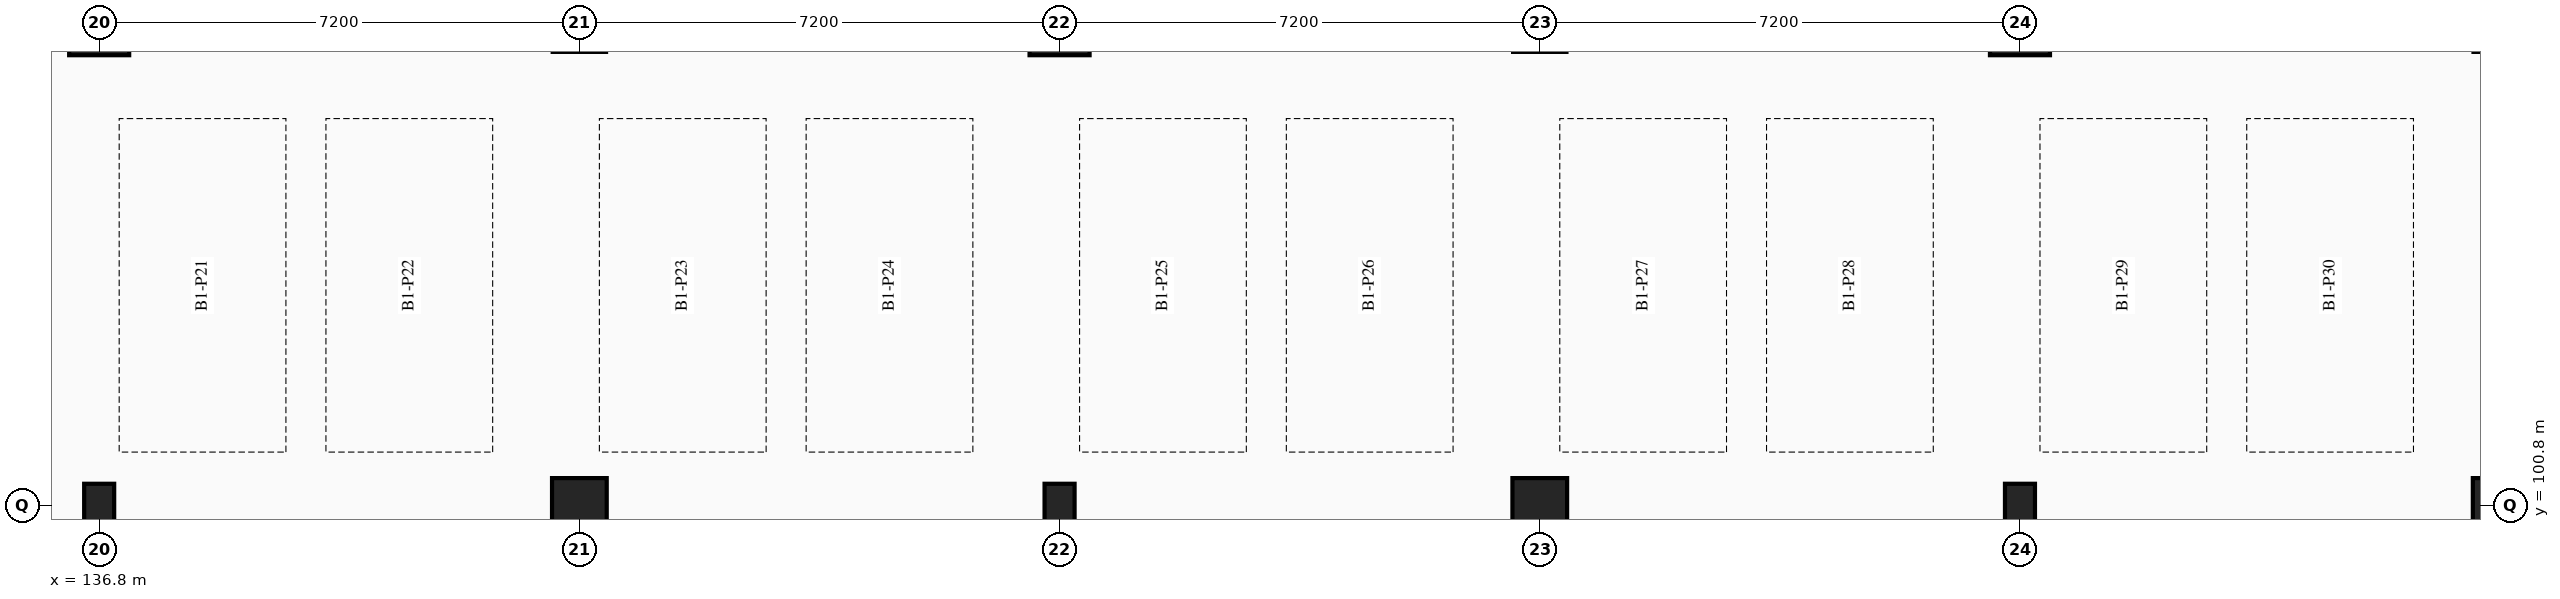
"""IFC4 building model, lengths in metres.
Left out: names, types, materials, properties, quantities, classifications, styles, units other than length and angle.
Written with IfcOpenShell. Run it as: python <this file> out.ifc"""

import sys

from ifc_helpers import new_model, si_unit, direction, frame, origin, origin_2d, place, context, subcontext, project, spatial, rectangle, extrude, element, save


model = new_model("IFC4")
c1 = context("Model", 3, precision=1e-05, world=origin(), true_north=direction((0.0, 1.0)))
c2 = subcontext(c1, "Body", "Model", "MODEL_VIEW")
j1 = project(units=[si_unit("LENGTHUNIT", "METRE"), si_unit("PLANEANGLEUNIT", "RADIAN")], contexts=[c1])
p1 = place(None, origin())
s1 = spatial("IfcSite", under=j1, at=p1, CompositionType="ELEMENT")
p2 = place(p1, origin())
s2 = spatial("IfcBuilding", under=s1, at=p2, CompositionType="ELEMENT")
p3 = place(p2, frame((0.0, 0.0, -4.5)))
s3 = spatial("IfcBuildingStorey", under=s2, at=p3, CompositionType="ELEMENT", Elevation=-4.5)
p4 = place(p3, frame((136.8, 100.8, -0.45), z_axis=(0.0, 0.0, 1.0), x_axis=(1.0, 0.0, 0.0)))
e1 = element("IfcColumn", 1, at=p4, inside=s3, PredefinedType="PILASTER", context=c2, shape_type="SweptSolid", body=[
    extrude(rectangle(XDim=0.45, YDim=0.65, at=origin_2d()), origin(), (0.0, 0.0, 1.0), 4.95),
])
p5 = place(p3, frame((136.8, 108.0, -0.45), z_axis=(0.0, 0.0, 1.0), x_axis=(1.0, 0.0, 0.0)))
e2 = element("IfcColumn", 2, at=p5, inside=s3, PredefinedType="COLUMN", context=c2, shape_type="SweptSolid", body=[
    extrude(rectangle(XDim=0.9, YDim=0.9, at=origin_2d()), origin(), (0.0, 0.0, 1.0), 4.95),
])
p6 = place(p3, frame((144.0, 100.8, -0.45), z_axis=(0.0, 0.0, 1.0), x_axis=(1.0, 0.0, 0.0)))
e3 = element("IfcColumn", 3, at=p6, inside=s3, PredefinedType="COLUMN", context=c2, shape_type="SweptSolid", body=[
    extrude(rectangle(XDim=0.82, YDim=0.82, at=origin_2d()), origin(), (0.0, 0.0, 1.0), 4.95),
])
p7 = place(p3, frame((144.0, 108.0, -0.45), z_axis=(0.0, 0.0, 1.0), x_axis=(1.0, 0.0, 0.0)))
e4 = element("IfcColumn", 4, at=p7, inside=s3, PredefinedType="COLUMN", context=c2, shape_type="SweptSolid", body=[
    extrude(rectangle(XDim=0.8, YDim=0.8, at=origin_2d()), origin(), (0.0, 0.0, 1.0), 4.95),
])
p8 = place(p3, frame((151.2, 100.8, -0.45), z_axis=(0.0, 0.0, 1.0), x_axis=(1.0, 0.0, 0.0)))
e5 = element("IfcColumn", 5, at=p8, inside=s3, PredefinedType="PILASTER", context=c2, shape_type="SweptSolid", body=[
    extrude(rectangle(XDim=0.45, YDim=0.65, at=origin_2d()), origin(), (0.0, 0.0, 1.0), 4.95),
])
p9 = place(p3, frame((151.2, 108.0, -0.45), z_axis=(0.0, 0.0, 1.0), x_axis=(1.0, 0.0, 0.0)))
e6 = element("IfcColumn", 6, at=p9, inside=s3, PredefinedType="COLUMN", context=c2, shape_type="SweptSolid", body=[
    extrude(rectangle(XDim=0.9, YDim=0.9, at=origin_2d()), origin(), (0.0, 0.0, 1.0), 4.95),
])
p10 = place(p3, frame((158.4, 100.8, -0.45), z_axis=(0.0, 0.0, 1.0), x_axis=(1.0, 0.0, 0.0)))
e7 = element("IfcColumn", 7, at=p10, inside=s3, PredefinedType="COLUMN", context=c2, shape_type="SweptSolid", body=[
    extrude(rectangle(XDim=0.82, YDim=0.82, at=origin_2d()), origin(), (0.0, 0.0, 1.0), 4.95),
])
p11 = place(p3, frame((158.4, 108.0, -0.45), z_axis=(0.0, 0.0, 1.0), x_axis=(1.0, 0.0, 0.0)))
e8 = element("IfcColumn", 8, at=p11, inside=s3, PredefinedType="COLUMN", context=c2, shape_type="SweptSolid", body=[
    extrude(rectangle(XDim=0.8, YDim=0.8, at=origin_2d()), origin(), (0.0, 0.0, 1.0), 4.95),
])
p12 = place(p3, frame((165.6, 100.8, -0.45), z_axis=(0.0, 0.0, 1.0), x_axis=(1.0, 0.0, 0.0)))
e9 = element("IfcColumn", 9, at=p12, inside=s3, PredefinedType="PILASTER", context=c2, shape_type="SweptSolid", body=[
    extrude(rectangle(XDim=0.45, YDim=0.65, at=origin_2d()), origin(), (0.0, 0.0, 1.0), 4.95),
])
p13 = place(p3, frame((165.6, 108.0, -0.45), z_axis=(0.0, 0.0, 1.0), x_axis=(1.0, 0.0, 0.0)))
e10 = element("IfcColumn", 10, at=p13, inside=s3, PredefinedType="COLUMN", context=c2, shape_type="SweptSolid", body=[
    extrude(rectangle(XDim=0.9, YDim=0.9, at=origin_2d()), origin(), (0.0, 0.0, 1.0), 4.95),
])
p14 = place(p3, frame((172.8, 100.8, -0.45), z_axis=(0.0, 0.0, 1.0), x_axis=(1.0, 0.0, 0.0)))
e11 = element("IfcColumn", 11, at=p14, inside=s3, PredefinedType="COLUMN", context=c2, shape_type="SweptSolid", body=[
    extrude(rectangle(XDim=0.82, YDim=0.82, at=origin_2d()), origin(), (0.0, 0.0, 1.0), 4.95),
])
p15 = place(p3, frame((172.8, 108.0, -0.45), z_axis=(0.0, 0.0, 1.0), x_axis=(1.0, 0.0, 0.0)))
e12 = element("IfcColumn", 12, at=p15, inside=s3, PredefinedType="COLUMN", context=c2, shape_type="SweptSolid", body=[
    extrude(rectangle(XDim=0.8, YDim=0.8, at=origin_2d()), origin(), (0.0, 0.0, 1.0), 4.95),
])
save(model, sys.argv[1])
